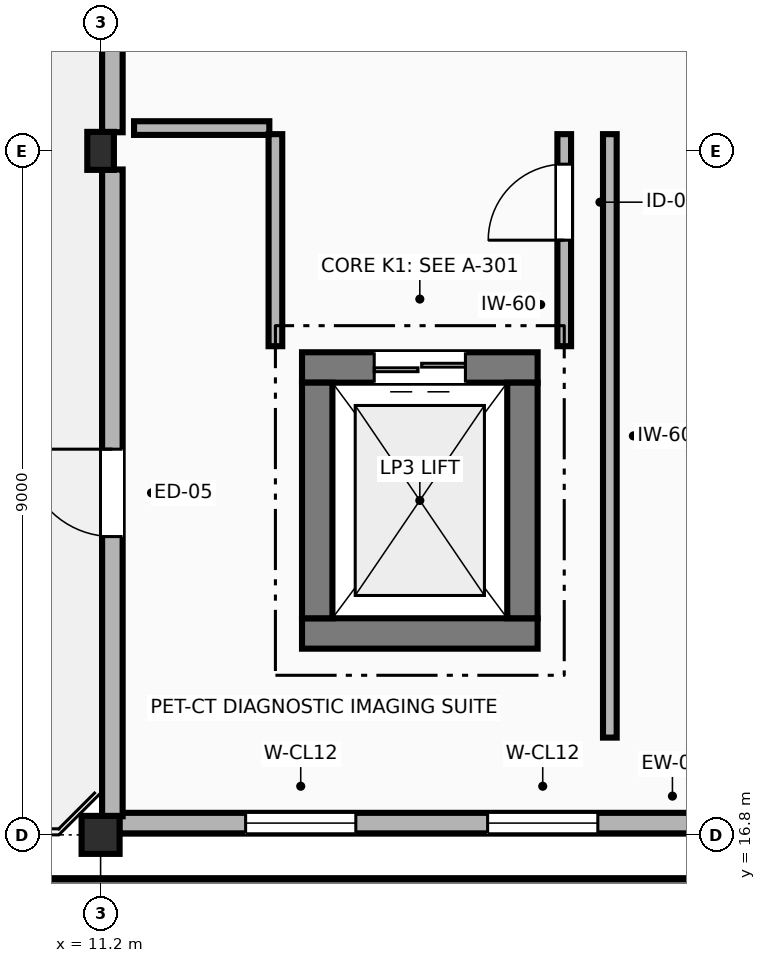
"""IFC4 building model, lengths in metres.
Left out: names, types, materials, properties, quantities, classifications, styles, units other than length and angle.
Written with IfcOpenShell. Run it as: python <this file> out.ifc"""

import sys

from ifc_helpers import new_model, si_unit, direction, frame, frame_2d, origin, origin_2d, place, context, subcontext, project, spatial, rectangle, extrude, element, fill, save


model = new_model("IFC4")
c1 = context("Model", 3, precision=1e-05, world=origin(), true_north=direction((0.0, 1.0)))
c2 = subcontext(c1, "Body", "Model", "MODEL_VIEW")
j1 = project(units=[si_unit("LENGTHUNIT", "METRE"), si_unit("PLANEANGLEUNIT", "RADIAN")], contexts=[c1])
p1 = place(None, origin())
s1 = spatial("IfcSite", under=j1, at=p1, CompositionType="ELEMENT")
p2 = place(p1, origin())
s2 = spatial("IfcBuilding", under=s1, at=p2, CompositionType="ELEMENT")
p3 = place(p2, frame((0.0, 0.0, 5.4)))
s3 = spatial("IfcBuildingStorey", under=s2, at=p3, CompositionType="ELEMENT", Elevation=5.4)
p4 = place(p3, frame((11.2, 16.8, 0.0), z_axis=(0.0, 0.0, 1.0), x_axis=(1.0, 0.0, 0.0)))
e1 = element("IfcColumn", 1, at=p4, inside=s3, PredefinedType="COLUMN", context=c2, shape_type="SweptSolid", body=[
    extrude(rectangle(XDim=0.5, YDim=0.5, at=origin_2d()), origin(), (0.0, 0.0, 1.0), 4.2),
])
p5 = place(p3, frame((11.2, 25.8, 0.0), z_axis=(0.0, 0.0, 1.0), x_axis=(1.0, 0.0, 0.0)))
e2 = element("IfcColumn", 2, at=p5, inside=s3, PredefinedType="COLUMN", context=c2, shape_type="SweptSolid", body=[
    extrude(rectangle(XDim=0.35, YDim=0.5, at=origin_2d()), origin(), (0.0, 0.0, 1.0), 4.2),
])
p6 = place(p3, frame((11.445, 16.955, 0.0), z_axis=(0.0, 0.0, 1.0), x_axis=(1.0, 0.0, 0.0)))
e3 = element("IfcWall", 3, at=p6, inside=s3, PredefinedType="STANDARD", context=c2, shape_type="SweptSolid", body=[
    extrude(rectangle(XDim=7.96, YDim=0.27, at=frame_2d((3.98, 0.0))), origin(), (0.0, 0.0, 1.0), 3.185),
])
p7 = place(p6, frame((1.663, 0.0, 0.95)))
e4 = element("IfcOpeningElement", 4, at=p7, cuts=e3, PredefinedType="OPENING", context=c2, shape_type="SweptSolid", body=[
    extrude(rectangle(XDim=1.45, YDim=1.7, at=frame_2d((0.725, 0.85))), frame((0.0, 0.145, 0.0), z_axis=(0.0, -1.0, 0.0), x_axis=(1.0, 0.0, 0.0)), (0.0, 0.0, 1.0), 0.29),
])
p8 = place(p6, frame((4.847, 0.0, 0.95)))
e5 = element("IfcOpeningElement", 5, at=p8, cuts=e3, PredefinedType="OPENING", context=c2, shape_type="SweptSolid", body=[
    extrude(rectangle(XDim=1.45, YDim=1.7, at=frame_2d((0.725, 0.85))), frame((0.0, 0.145, 0.0), z_axis=(0.0, -1.0, 0.0), x_axis=(1.0, 0.0, 0.0)), (0.0, 0.0, 1.0), 0.29),
])
p9 = place(p3, frame((11.355, 34.33, 0.0), z_axis=(0.0, 0.0, 1.0), x_axis=(0.0, -1.0, 0.0)))
e6 = element("IfcWall", 6, at=p9, inside=s3, PredefinedType="STANDARD", context=c2, shape_type="SweptSolid", body=[
    extrude(rectangle(XDim=8.285, YDim=0.27, at=frame_2d((4.143, 0.0))), origin(), (0.0, 0.0, 1.0), 3.295),
])
p10 = place(p3, frame((11.355, 25.555, 0.0), z_axis=(0.0, 0.0, 1.0), x_axis=(0.0, -1.0, 0.0)))
e7 = element("IfcWall", 7, at=p10, inside=s3, PredefinedType="STANDARD", context=c2, shape_type="SweptSolid", body=[
    extrude(rectangle(XDim=8.51, YDim=0.27, at=frame_2d((4.255, 0.0))), origin(), (0.0, 0.0, 1.0), 3.195),
])
p11 = place(p10, frame((3.68, 0.0, 0.0)))
e8 = element("IfcOpeningElement", 8, at=p11, cuts=e7, PredefinedType="OPENING", context=c2, shape_type="SweptSolid", body=[
    extrude(rectangle(XDim=1.15, YDim=2.2, at=frame_2d((0.575, 1.1))), frame((0.0, 0.145, 0.0), z_axis=(0.0, -1.0, 0.0), x_axis=(1.0, 0.0, 0.0)), (0.0, 0.0, 1.0), 0.29),
])
p12 = place(p3, frame((50.9, 16.1, 0.0), z_axis=(0.0, 0.0, 1.0), x_axis=(-1.0, 0.0, 0.0)))
e9 = element("IfcWall", 9, at=p12, inside=s3, PredefinedType="PARAPET", context=c2, shape_type="SweptSolid", body=[
    extrude(rectangle(XDim=47.25, YDim=0.23, at=frame_2d((23.625, 0.0))), origin(), (0.0, 0.0, 1.0), 1.05),
])
p13 = place(p3, frame((13.85, 19.45, 0.0), z_axis=(0.0, 0.0, 1.0), x_axis=(1.0, 0.0, 0.0)))
e10 = element("IfcWall", 10, at=p13, inside=s3, PredefinedType="SHEAR", context=c2, shape_type="SweptSolid", body=[
    extrude(rectangle(XDim=3.1, YDim=0.4, at=frame_2d((1.55, 0.0))), origin(), (0.0, 0.0, 1.0), 4.2),
])
p14 = place(p3, frame((16.95, 22.95, 0.0), z_axis=(0.0, 0.0, 1.0), x_axis=(-1.0, 0.0, 0.0)))
e11 = element("IfcWall", 11, at=p14, inside=s3, PredefinedType="SHEAR", context=c2, shape_type="SweptSolid", body=[
    extrude(rectangle(XDim=3.1, YDim=0.4, at=frame_2d((1.55, 0.0))), origin(), (0.0, 0.0, 1.0), 4.2),
])
p15 = place(p14, frame((0.95, 0.0, 0.0)))
e12 = element("IfcOpeningElement", 12, at=p15, cuts=e11, PredefinedType="OPENING", context=c2, shape_type="SweptSolid", body=[
    extrude(rectangle(XDim=1.2, YDim=2.2, at=frame_2d((0.6, 1.1))), frame((0.0, 0.21, 0.0), z_axis=(0.0, -1.0, 0.0), x_axis=(1.0, 0.0, 0.0)), (0.0, 0.0, 1.0), 0.42),
])
for number, where, z_axis, x_axis in (
    (13, (14.05, 19.65, 0.0), (0.0, 0.0, 1.0), (0.0, 1.0, 0.0)),
    (14, (16.75, 22.75, 0.0), (0.0, 0.0, 1.0), (0.0, -1.0, 0.0)),
):
    element("IfcWall", number, at=place(p3, frame(where, z_axis=z_axis, x_axis=x_axis)), inside=s3, PredefinedType="SHEAR", context=c2, shape_type="SweptSolid", body=[
        extrude(rectangle(XDim=3.1, YDim=0.4, at=frame_2d((1.55, 0.0))), origin(), (0.0, 0.0, 1.0), 4.2),
    ])
p16 = place(p3, frame((17.3, 23.23, 0.0), z_axis=(0.0, 0.0, 1.0), x_axis=(0.0, 1.0, 0.0)))
e15 = element("IfcWall", 15, at=p16, inside=s3, PredefinedType="PARTITIONING", context=c2, shape_type="SweptSolid", body=[
    extrude(rectangle(XDim=2.79, YDim=0.18, at=frame_2d((1.395, 0.0))), origin(), (0.0, 0.0, 1.0), 3.85),
])
p17 = place(p16, frame((1.395, 0.0, 0.0)))
e16 = element("IfcOpeningElement", 16, at=p17, cuts=e15, PredefinedType="OPENING", context=c2, shape_type="SweptSolid", body=[
    extrude(rectangle(XDim=1.0, YDim=2.15, at=frame_2d((0.5, 1.075))), frame((0.0, 0.1, 0.0), z_axis=(0.0, -1.0, 0.0), x_axis=(1.0, 0.0, 0.0)), (0.0, 0.0, 1.0), 0.2),
])
p18 = place(p3, frame((17.9, 26.02, 0.0), z_axis=(0.0, 0.0, 1.0), x_axis=(0.0, -1.0, 0.0)))
e17 = element("IfcWall", 17, at=p18, inside=s3, PredefinedType="PARTITIONING", context=c2, shape_type="SweptSolid", body=[
    extrude(rectangle(XDim=7.94, YDim=0.18, at=frame_2d((3.97, 0.0))), origin(), (0.0, 0.0, 1.0), 3.85),
])
p19 = place(p3, frame((11.64, 26.1, 0.0), z_axis=(0.0, 0.0, 1.0), x_axis=(1.0, 0.0, 0.0)))
e18 = element("IfcWall", 18, at=p19, inside=s3, PredefinedType="PARTITIONING", context=c2, shape_type="SweptSolid", body=[
    extrude(rectangle(XDim=1.78, YDim=0.18, at=frame_2d((0.89, 0.0))), origin(), (0.0, 0.0, 1.0), 3.185),
])
p20 = place(p3, frame((13.5, 26.02, 0.0), z_axis=(0.0, 0.0, 1.0), x_axis=(0.0, -1.0, 0.0)))
e19 = element("IfcWall", 19, at=p20, inside=s3, PredefinedType="PARTITIONING", context=c2, shape_type="SweptSolid", body=[
    extrude(rectangle(XDim=2.79, YDim=0.18, at=frame_2d((1.395, 0.0))), origin(), (0.0, 0.0, 1.0), 3.85),
])
p21 = place(p7, origin())
e20 = element("IfcWindow", 20, at=p21, inside=s3, PartitioningType="SINGLE_PANEL", PredefinedType="WINDOW", context=c2, shape_type="SweptSolid", body=[
    extrude(rectangle(XDim=1.45, YDim=1.7, at=frame_2d((0.725, 0.85))), frame((0.0, 0.03, 0.0), z_axis=(0.0, -1.0, 0.0), x_axis=(1.0, 0.0, 0.0)), (0.0, 0.0, 1.0), 0.06),
])
fill(e4, e20)
p22 = place(p8, origin())
e21 = element("IfcWindow", 21, at=p22, inside=s3, PartitioningType="SINGLE_PANEL", PredefinedType="WINDOW", context=c2, shape_type="SweptSolid", body=[
    extrude(rectangle(XDim=1.45, YDim=1.7, at=frame_2d((0.725, 0.85))), frame((0.0, 0.03, 0.0), z_axis=(0.0, -1.0, 0.0), x_axis=(1.0, 0.0, 0.0)), (0.0, 0.0, 1.0), 0.06),
])
fill(e5, e21)
p23 = place(p11, frame((1.15, 0.0, 0.0), z_axis=(0.0, 0.0, 1.0), x_axis=(-1.0, 0.0, 0.0)))
e22 = element("IfcDoor", 22, at=p23, inside=s3, OperationType="SINGLE_SWING_RIGHT", PredefinedType="DOOR", context=c2, shape_type="SweptSolid", body=[
    extrude(rectangle(XDim=1.15, YDim=2.2, at=frame_2d((0.575, 1.1))), frame((0.0, 0.025, 0.0), z_axis=(0.0, -1.0, 0.0), x_axis=(1.0, 0.0, 0.0)), (0.0, 0.0, 1.0), 0.05),
])
fill(e8, e22)
p24 = place(p15, origin())
e23 = element("IfcDoor", 23, at=p24, inside=s3, OperationType="DOUBLE_DOOR_SLIDING", PredefinedType="DOOR", context=c2, shape_type="SweptSolid", body=[
    extrude(rectangle(XDim=1.2, YDim=2.2, at=frame_2d((0.6, 1.1))), frame((0.0, 0.025, 0.0), z_axis=(0.0, -1.0, 0.0), x_axis=(1.0, 0.0, 0.0)), (0.0, 0.0, 1.0), 0.05),
])
fill(e12, e23)
p25 = place(p17, origin())
e24 = element("IfcDoor", 24, at=p25, inside=s3, OperationType="SINGLE_SWING_LEFT", PredefinedType="DOOR", context=c2, shape_type="SweptSolid", body=[
    extrude(rectangle(XDim=1.0, YDim=2.15, at=frame_2d((0.5, 1.075))), frame((0.0, 0.025, 0.0), z_axis=(0.0, -1.0, 0.0), x_axis=(1.0, 0.0, 0.0)), (0.0, 0.0, 1.0), 0.05),
])
fill(e16, e24)
save(model, sys.argv[1])
